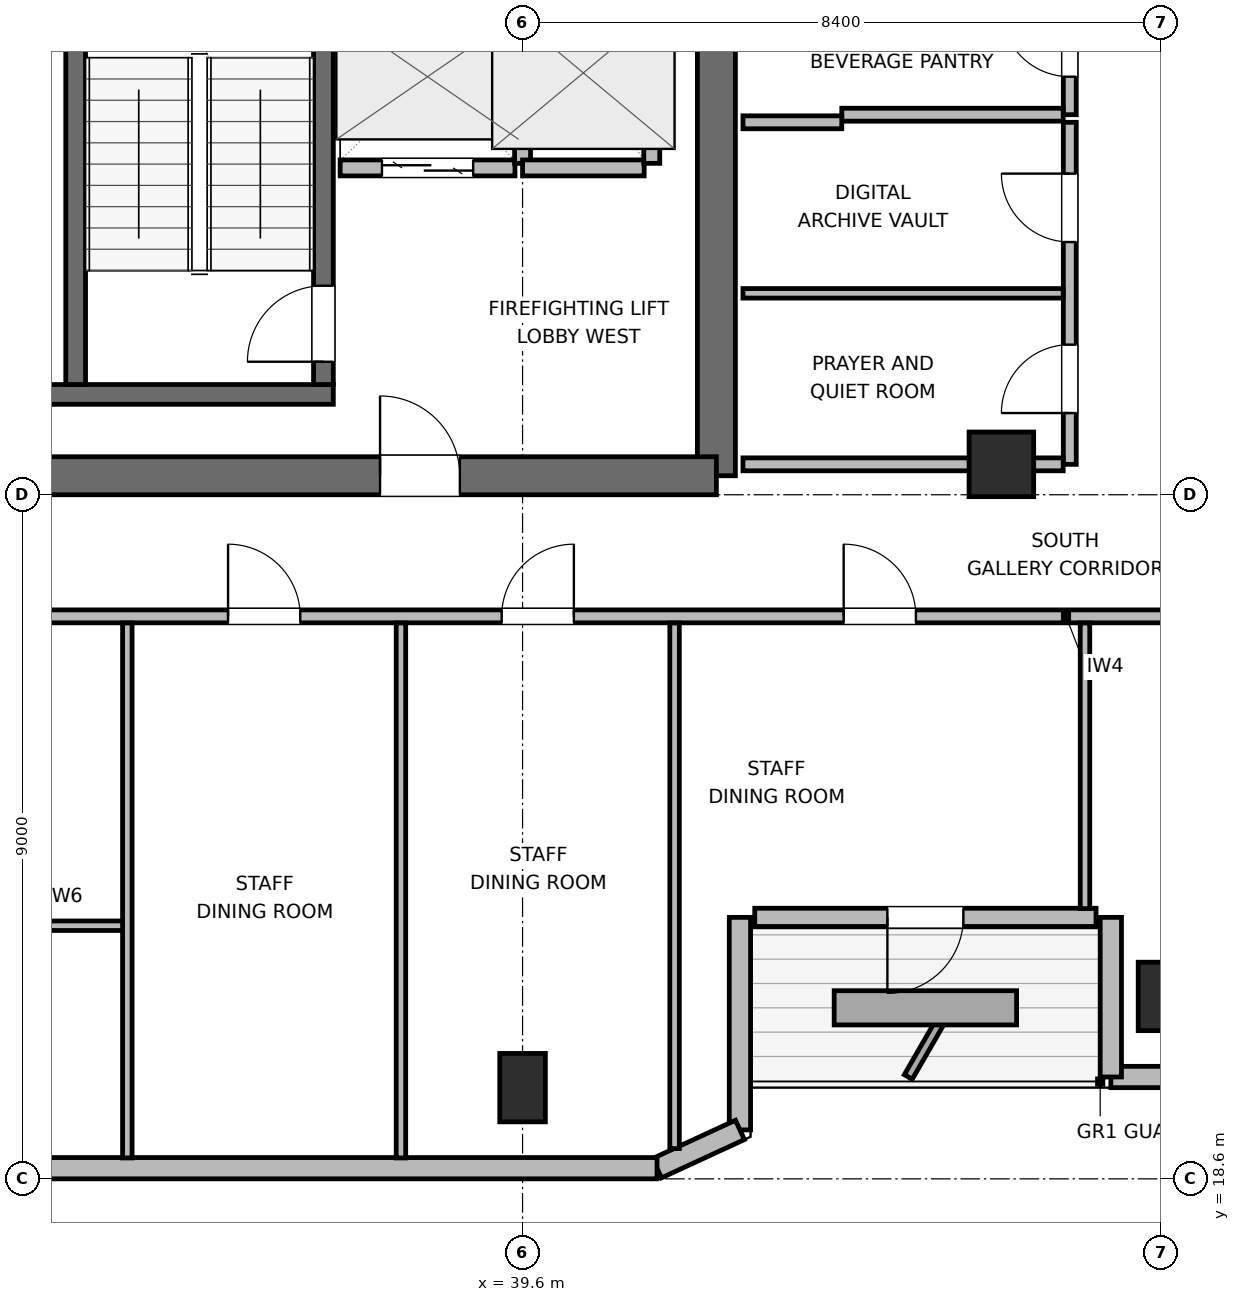
"""IFC4 building model, lengths in metres.
Left out: names, types, materials, properties, quantities, classifications, styles, units other than length and angle.
Written with IfcOpenShell. Run it as: python <this file> out.ifc"""

import sys

from ifc_helpers import new_model, si_unit, direction, frame, frame_2d, origin, origin_2d, place, context, subcontext, project, spatial, rectangle, extrude, element, fill, save


model = new_model("IFC4")
c1 = context("Model", 3, precision=1e-05, world=origin(), true_north=direction((0.0, 1.0)))
c2 = subcontext(c1, "Body", "Model", "MODEL_VIEW")
j1 = project(units=[si_unit("LENGTHUNIT", "METRE"), si_unit("PLANEANGLEUNIT", "RADIAN")], contexts=[c1])
p1 = place(None, origin())
s1 = spatial("IfcSite", under=j1, at=p1, CompositionType="ELEMENT")
p2 = place(p1, origin())
s2 = spatial("IfcBuilding", under=s1, at=p2, CompositionType="ELEMENT")
p3 = place(p2, frame((0.0, 0.0, 302.4)))
s3 = spatial("IfcBuildingStorey", under=s2, at=p3, CompositionType="ELEMENT", Elevation=302.4)
p4 = place(p3, frame((42.15, 27.85, 0.0), z_axis=(0.0, 0.0, 1.0), x_axis=(0.0, 1.0, 0.0)))
e1 = element("IfcWall", 1, at=p4, inside=s3, PredefinedType="SHEAR", context=c2, shape_type="SweptSolid", body=[
    extrude(rectangle(XDim=6.55, YDim=0.5, at=frame_2d((3.275, 0.0))), origin(), (0.0, 0.0, 1.0), 3.9),
])
p5 = place(p3, frame((32.65, 27.85, 0.0), z_axis=(0.0, 0.0, 1.0), x_axis=(1.0, 0.0, 0.0)))
e2 = element("IfcWall", 2, at=p5, inside=s3, PredefinedType="SHEAR", context=c2, shape_type="SweptSolid", body=[
    extrude(rectangle(XDim=9.5, YDim=0.5, at=frame_2d((4.75, 0.0))), origin(), (0.0, 0.0, 1.0), 3.9),
])
p6 = place(p5, frame((5.075, 0.0, 0.0)))
e3 = element("IfcOpeningElement", 3, at=p6, cuts=e2, PredefinedType="OPENING", context=c2, shape_type="SweptSolid", body=[
    extrude(rectangle(XDim=1.05, YDim=2.04, at=frame_2d((0.525, 1.02))), frame((0.0, 0.26, 0.0), z_axis=(0.0, -1.0, 0.0), x_axis=(1.0, 0.0, 0.0)), (0.0, 0.0, 1.0), 0.52),
])
p7 = place(p3, frame((32.9, 28.92, 0.0), z_axis=(0.0, 0.0, 1.0), x_axis=(1.0, 0.0, 0.0)))
e4 = element("IfcWall", 4, at=p7, inside=s3, PredefinedType="SHEAR", context=c2, shape_type="SweptSolid", body=[
    extrude(rectangle(XDim=4.21, YDim=0.26, at=frame_2d((2.105, 0.0))), origin(), (0.0, 0.0, 1.0), 3.9),
])
p8 = place(p3, frame((33.72, 29.05, 0.0), z_axis=(0.0, 0.0, 1.0), x_axis=(0.0, 1.0, 0.0)))
e5 = element("IfcWall", 5, at=p8, inside=s3, PredefinedType="SHEAR", context=c2, shape_type="SweptSolid", body=[
    extrude(rectangle(XDim=7.6, YDim=0.26, at=frame_2d((3.8, 0.0))), origin(), (0.0, 0.0, 1.0), 3.9),
])
p9 = place(p3, frame((36.98, 29.05, 0.0), z_axis=(0.0, 0.0, 1.0), x_axis=(0.0, 1.0, 0.0)))
e6 = element("IfcWall", 6, at=p9, inside=s3, PredefinedType="SHEAR", context=c2, shape_type="SweptSolid", body=[
    extrude(rectangle(XDim=7.6, YDim=0.26, at=frame_2d((3.8, 0.0))), origin(), (0.0, 0.0, 1.0), 3.9),
])
p10 = place(p9, frame((0.3, 0.0, 0.0)))
e7 = element("IfcOpeningElement", 7, at=p10, cuts=e6, PredefinedType="OPENING", context=c2, shape_type="SweptSolid", body=[
    extrude(rectangle(XDim=1.0, YDim=2.04, at=frame_2d((0.5, 1.02))), frame((0.0, 0.14, 0.0), z_axis=(0.0, -1.0, 0.0), x_axis=(1.0, 0.0, 0.0)), (0.0, 0.0, 1.0), 0.28),
])
for number, where, z_axis, x_axis in (
    (8, (39.6, 19.8, 0.0), (0.0, 0.0, 1.0), (1.0, 0.0, 0.0)),
    (9, (48.0, 21.0, 0.0), (0.0, 0.0, 1.0), (1.0, 0.0, 0.0)),
):
    element("IfcColumn", number, at=place(p3, frame(where, z_axis=z_axis, x_axis=x_axis)), inside=s3, PredefinedType="COLUMN", context=c2, shape_type="SweptSolid", body=[
        extrude(rectangle(XDim=0.6, YDim=0.9, at=origin_2d()), origin(), (0.0, 0.0, 1.0), 3.9),
    ])
p11 = place(p3, frame((45.9, 28.0, 0.0), z_axis=(0.0, 0.0, 1.0), x_axis=(1.0, 0.0, 0.0)))
e10 = element("IfcColumn", 10, at=p11, inside=s3, PredefinedType="COLUMN", context=c2, shape_type="SweptSolid", body=[
    extrude(rectangle(XDim=0.85, YDim=0.85, at=origin_2d()), origin(), (0.0, 0.0, 1.0), 3.9),
])
p12 = place(p3, frame((52.031, 19.94, 0.0), z_axis=(0.0, 0.0, 1.0), x_axis=(-1.0, 0.0, 0.0)))
e11 = element("IfcWall", 11, at=p12, inside=s3, PredefinedType="SOLIDWALL", context=c2, shape_type="SweptSolid", body=[
    extrude(rectangle(XDim=4.691, YDim=0.28, at=frame_2d((2.345, 0.0))), origin(), (0.0, 0.0, 1.0), 2.265),
])
p13 = place(p12, frame((1.766, 0.0, 0.85)))
e12 = element("IfcOpeningElement", 12, at=p13, cuts=e11, PredefinedType="OPENING", context=c2, shape_type="SweptSolid", body=[
    extrude(rectangle(XDim=1.6, YDim=1.0, at=frame_2d((0.8, 0.5))), frame((0.0, 0.15, 0.0), z_axis=(0.0, -1.0, 0.0), x_axis=(1.0, 0.0, 0.0)), (0.0, 0.0, 1.0), 0.3),
])
p14 = place(p3, frame((47.34, 19.94, 0.0), z_axis=(0.0, 0.0, 1.0), x_axis=(0.0, 1.0, 0.0)))
e13 = element("IfcWall", 13, at=p14, inside=s3, PredefinedType="SOLIDWALL", context=c2, shape_type="SweptSolid", body=[
    extrude(rectangle(XDim=2.1, YDim=0.28, at=frame_2d((1.05, 0.0))), origin(), (0.0, 0.0, 1.0), 2.265),
])
p15 = place(p3, frame((47.145, 22.04, 0.0), z_axis=(0.0, 0.0, 1.0), x_axis=(-1.0, 0.0, 0.0)))
e14 = element("IfcWall", 14, at=p15, inside=s3, PredefinedType="SOLIDWALL", context=c2, shape_type="SweptSolid", body=[
    extrude(rectangle(XDim=4.49, YDim=0.24, at=frame_2d((2.245, 0.0))), origin(), (0.0, 0.0, 1.0), 3.68),
])
p16 = place(p15, frame((1.745, 0.0, 0.0)))
e15 = element("IfcOpeningElement", 15, at=p16, cuts=e14, PredefinedType="OPENING", context=c2, shape_type="SweptSolid", body=[
    extrude(rectangle(XDim=1.0, YDim=2.02, at=frame_2d((0.5, 1.01))), frame((0.0, 0.13, 0.0), z_axis=(0.0, -1.0, 0.0), x_axis=(1.0, 0.0, 0.0)), (0.0, 0.0, 1.0), 0.26),
])
p17 = place(p3, frame((42.46, 22.04, 0.0), z_axis=(0.0, 0.0, 1.0), x_axis=(0.0, -1.0, 0.0)))
e16 = element("IfcWall", 16, at=p17, inside=s3, PredefinedType="SOLIDWALL", context=c2, shape_type="SweptSolid", body=[
    extrude(rectangle(XDim=2.796, YDim=0.28, at=frame_2d((1.398, 0.0))), origin(), (0.0, 0.0, 1.0), 2.265),
])
p18 = place(p3, frame((42.46, 19.244, 0.0), z_axis=(0.0, 0.0, 1.0), x_axis=(-0.907893953211, -0.419199916176, 0.0)))
e17 = element("IfcWall", 17, at=p18, inside=s3, PredefinedType="SOLIDWALL", context=c2, shape_type="SweptSolid", body=[
    extrude(rectangle(XDim=1.201, YDim=0.28, at=frame_2d((0.601, 0.0))), origin(), (0.0, 0.0, 1.0), 3.68),
])
p19 = place(p3, frame((41.369, 18.74, 0.0), z_axis=(0.0, 0.0, 1.0), x_axis=(-1.0, 0.0, 0.0)))
e18 = element("IfcWall", 18, at=p19, inside=s3, PredefinedType="SOLIDWALL", context=c2, shape_type="SweptSolid", body=[
    extrude(rectangle(XDim=11.351, YDim=0.28, at=frame_2d((5.675, 0.0))), origin(), (0.0, 0.0, 1.0), 3.68),
])
p20 = place(p3, frame((37.2, 31.9, 0.0), z_axis=(0.0, 0.0, 1.0), x_axis=(1.0, 0.0, 0.0)))
e19 = element("IfcWall", 19, at=p20, inside=s3, PredefinedType="PARTITIONING", context=c2, shape_type="SweptSolid", body=[
    extrude(rectangle(XDim=2.3, YDim=0.21, at=frame_2d((1.15, 0.0))), origin(), (0.0, 0.0, 1.0), 3.68),
])
p21 = place(p20, frame((0.55, 0.0, 0.0)))
e20 = element("IfcOpeningElement", 20, at=p21, cuts=e19, PredefinedType="OPENING", context=c2, shape_type="SweptSolid", body=[
    extrude(rectangle(XDim=1.2, YDim=2.04, at=frame_2d((0.6, 1.02))), frame((0.0, 0.115, 0.0), z_axis=(0.0, -1.0, 0.0), x_axis=(1.0, 0.0, 0.0)), (0.0, 0.0, 1.0), 0.23),
])
p22 = place(p3, frame((39.6, 31.96, 0.0), z_axis=(0.0, 0.0, 1.0), x_axis=(0.0, 1.0, 0.0)))
e21 = element("IfcWall", 21, at=p22, inside=s3, PredefinedType="PARTITIONING", context=c2, shape_type="SweptSolid", body=[
    extrude(rectangle(XDim=2.28, YDim=0.21, at=frame_2d((1.14, 0.0))), origin(), (0.0, 0.0, 1.0), 3.68),
])
p23 = place(p3, frame((39.6, 31.9, 0.0), z_axis=(0.0, 0.0, 1.0), x_axis=(1.0, 0.0, 0.0)))
e22 = element("IfcWall", 22, at=p23, inside=s3, PredefinedType="PARTITIONING", context=c2, shape_type="SweptSolid", body=[
    extrude(rectangle(XDim=1.6, YDim=0.21, at=frame_2d((0.8, 0.0))), origin(), (0.0, 0.0, 1.0), 3.68),
])
p24 = place(p3, frame((41.3, 31.96, 0.0), z_axis=(0.0, 0.0, 1.0), x_axis=(0.0, 1.0, 0.0)))
e23 = element("IfcWall", 23, at=p24, inside=s3, PredefinedType="PARTITIONING", context=c2, shape_type="SweptSolid", body=[
    extrude(rectangle(XDim=2.38, YDim=0.21, at=frame_2d((1.19, 0.0))), origin(), (0.0, 0.0, 1.0), 3.68),
])
p25 = place(p3, frame((46.8, 32.6, 0.0), z_axis=(0.0, 0.0, 1.0), x_axis=(0.0, 1.0, 0.0)))
e24 = element("IfcWall", 24, at=p25, inside=s3, PredefinedType="PARTITIONING", context=c2, shape_type="SweptSolid", body=[
    extrude(rectangle(XDim=3.8, YDim=0.17, at=frame_2d((1.9, 0.0))), origin(), (0.0, 0.0, 1.0), 3.68),
])
p26 = place(p25, frame((0.5, 0.0, 0.0)))
e25 = element("IfcOpeningElement", 25, at=p26, cuts=e24, PredefinedType="OPENING", context=c2, shape_type="SweptSolid", body=[
    extrude(rectangle(XDim=0.9, YDim=2.02, at=frame_2d((0.45, 1.01))), frame((0.0, 0.095, 0.0), z_axis=(0.0, -1.0, 0.0), x_axis=(1.0, 0.0, 0.0)), (0.0, 0.0, 1.0), 0.19),
])
p27 = place(p25, frame((2.4, 0.0, 0.0)))
e26 = element("IfcOpeningElement", 26, at=p27, cuts=e24, PredefinedType="OPENING", context=c2, shape_type="SweptSolid", body=[
    extrude(rectangle(XDim=0.9, YDim=2.02, at=frame_2d((0.45, 1.01))), frame((0.0, 0.095, 0.0), z_axis=(0.0, -1.0, 0.0), x_axis=(1.0, 0.0, 0.0)), (0.0, 0.0, 1.0), 0.19),
])
p28 = place(p3, frame((43.8, 32.6, 0.0), z_axis=(0.0, 0.0, 1.0), x_axis=(1.0, 0.0, 0.0)))
e27 = element("IfcWall", 27, at=p28, inside=s3, PredefinedType="PARTITIONING", context=c2, shape_type="SweptSolid", body=[
    extrude(rectangle(XDim=2.913, YDim=0.17, at=frame_2d((1.457, 0.0))), origin(), (0.0, 0.0, 1.0), 3.68),
])
p29 = place(p3, frame((46.8, 28.0, 0.0), z_axis=(0.0, 0.0, 1.0), x_axis=(0.0, 1.0, 0.0)))
e28 = element("IfcWall", 28, at=p29, inside=s3, PredefinedType="PARTITIONING", context=c2, shape_type="SweptSolid", body=[
    extrude(rectangle(XDim=4.5, YDim=0.17, at=frame_2d((2.25, 0.0))), origin(), (0.0, 0.0, 1.0), 3.68),
])
p30 = place(p29, frame((0.675, 0.0, 0.0)))
e29 = element("IfcOpeningElement", 29, at=p30, cuts=e28, PredefinedType="OPENING", context=c2, shape_type="SweptSolid", body=[
    extrude(rectangle(XDim=0.9, YDim=2.02, at=frame_2d((0.45, 1.01))), frame((0.0, 0.095, 0.0), z_axis=(0.0, -1.0, 0.0), x_axis=(1.0, 0.0, 0.0)), (0.0, 0.0, 1.0), 0.19),
])
p31 = place(p29, frame((2.925, 0.0, 0.0)))
e30 = element("IfcOpeningElement", 30, at=p31, cuts=e28, PredefinedType="OPENING", context=c2, shape_type="SweptSolid", body=[
    extrude(rectangle(XDim=0.9, YDim=2.02, at=frame_2d((0.45, 1.01))), frame((0.0, 0.095, 0.0), z_axis=(0.0, -1.0, 0.0), x_axis=(1.0, 0.0, 0.0)), (0.0, 0.0, 1.0), 0.19),
])
p32 = place(p3, frame((42.5, 28.0, 0.0), z_axis=(0.0, 0.0, 1.0), x_axis=(1.0, 0.0, 0.0)))
e31 = element("IfcWall", 31, at=p32, inside=s3, PredefinedType="PARTITIONING", context=c2, shape_type="SweptSolid", body=[
    extrude(rectangle(XDim=4.213, YDim=0.17, at=frame_2d((2.106, 0.0))), origin(), (0.0, 0.0, 1.0), 2.765),
])
p33 = place(p3, frame((42.5, 32.5, 0.0), z_axis=(0.0, 0.0, 1.0), x_axis=(1.0, 0.0, 0.0)))
e32 = element("IfcWall", 32, at=p33, inside=s3, PredefinedType="PARTITIONING", context=c2, shape_type="SweptSolid", body=[
    extrude(rectangle(XDim=1.3, YDim=0.17, at=frame_2d((0.65, 0.0))), origin(), (0.0, 0.0, 1.0), 3.68),
])
p34 = place(p3, frame((42.5, 30.25, 0.0), z_axis=(0.0, 0.0, 1.0), x_axis=(1.0, 0.0, 0.0)))
e33 = element("IfcWall", 33, at=p34, inside=s3, PredefinedType="PARTITIONING", context=c2, shape_type="SweptSolid", body=[
    extrude(rectangle(XDim=4.213, YDim=0.125, at=frame_2d((2.106, 0.0))), origin(), (0.0, 0.0, 1.0), 3.68),
])
p35 = place(p3, frame((30.725, 26.0, 0.0), z_axis=(0.0, 0.0, 1.0), x_axis=(1.0, 0.0, 0.0)))
e34 = element("IfcWall", 34, at=p35, inside=s3, PredefinedType="PARTITIONING", context=c2, shape_type="SweptSolid", body=[
    extrude(rectangle(XDim=32.875, YDim=0.17, at=frame_2d((16.438, 0.0))), origin(), (0.0, 0.0, 1.0), 3.68),
])
p36 = place(p35, frame((1.362, 0.0, 0.0)))
e35 = element("IfcOpeningElement", 35, at=p36, cuts=e34, PredefinedType="OPENING", context=c2, shape_type="SweptSolid", body=[
    extrude(rectangle(XDim=0.95, YDim=2.04, at=frame_2d((0.475, 1.02))), frame((0.0, 0.095, 0.0), z_axis=(0.0, -1.0, 0.0), x_axis=(1.0, 0.0, 0.0)), (0.0, 0.0, 1.0), 0.19),
])
p37 = place(p35, frame((5.0, 0.0, 0.0)))
e36 = element("IfcOpeningElement", 36, at=p37, cuts=e34, PredefinedType="OPENING", context=c2, shape_type="SweptSolid", body=[
    extrude(rectangle(XDim=0.95, YDim=2.04, at=frame_2d((0.475, 1.02))), frame((0.0, 0.095, 0.0), z_axis=(0.0, -1.0, 0.0), x_axis=(1.0, 0.0, 0.0)), (0.0, 0.0, 1.0), 0.19),
])
p38 = place(p35, frame((8.6, 0.0, 0.0)))
e37 = element("IfcOpeningElement", 37, at=p38, cuts=e34, PredefinedType="OPENING", context=c2, shape_type="SweptSolid", body=[
    extrude(rectangle(XDim=0.95, YDim=2.04, at=frame_2d((0.475, 1.02))), frame((0.0, 0.095, 0.0), z_axis=(0.0, -1.0, 0.0), x_axis=(1.0, 0.0, 0.0)), (0.0, 0.0, 1.0), 0.19),
])
p39 = place(p35, frame((13.1, 0.0, 0.0)))
e38 = element("IfcOpeningElement", 38, at=p39, cuts=e34, PredefinedType="OPENING", context=c2, shape_type="SweptSolid", body=[
    extrude(rectangle(XDim=0.95, YDim=2.04, at=frame_2d((0.475, 1.02))), frame((0.0, 0.095, 0.0), z_axis=(0.0, -1.0, 0.0), x_axis=(1.0, 0.0, 0.0)), (0.0, 0.0, 1.0), 0.19),
])
p40 = place(p35, frame((18.0, 0.0, 0.0)))
e39 = element("IfcOpeningElement", 39, at=p40, cuts=e34, PredefinedType="OPENING", context=c2, shape_type="SweptSolid", body=[
    extrude(rectangle(XDim=0.95, YDim=2.04, at=frame_2d((0.475, 1.02))), frame((0.0, 0.095, 0.0), z_axis=(0.0, -1.0, 0.0), x_axis=(1.0, 0.0, 0.0)), (0.0, 0.0, 1.0), 0.19),
])
p41 = place(p35, frame((22.4, 0.0, 0.0)))
e40 = element("IfcOpeningElement", 40, at=p41, cuts=e34, PredefinedType="OPENING", context=c2, shape_type="SweptSolid", body=[
    extrude(rectangle(XDim=0.95, YDim=2.04, at=frame_2d((0.475, 1.02))), frame((0.0, 0.095, 0.0), z_axis=(0.0, -1.0, 0.0), x_axis=(1.0, 0.0, 0.0)), (0.0, 0.0, 1.0), 0.19),
])
p42 = place(p35, frame((26.8, 0.0, 0.0)))
e41 = element("IfcOpeningElement", 41, at=p42, cuts=e34, PredefinedType="OPENING", context=c2, shape_type="SweptSolid", body=[
    extrude(rectangle(XDim=0.95, YDim=2.04, at=frame_2d((0.475, 1.02))), frame((0.0, 0.095, 0.0), z_axis=(0.0, -1.0, 0.0), x_axis=(1.0, 0.0, 0.0)), (0.0, 0.0, 1.0), 0.19),
])
p43 = place(p35, frame((30.7, 0.0, 0.0)))
e42 = element("IfcOpeningElement", 42, at=p43, cuts=e34, PredefinedType="OPENING", context=c2, shape_type="SweptSolid", body=[
    extrude(rectangle(XDim=0.95, YDim=2.04, at=frame_2d((0.475, 1.02))), frame((0.0, 0.095, 0.0), z_axis=(0.0, -1.0, 0.0), x_axis=(1.0, 0.0, 0.0)), (0.0, 0.0, 1.0), 0.19),
])
p44 = place(p3, frame((25.885, 21.93, 0.0), z_axis=(0.0, 0.0, 1.0), x_axis=(1.0, 0.0, 0.0)))
e43 = element("IfcWall", 43, at=p44, inside=s3, PredefinedType="PARTITIONING", context=c2, shape_type="SweptSolid", body=[
    extrude(rectangle(XDim=8.515, YDim=0.125, at=frame_2d((4.257, 0.0))), origin(), (0.0, 0.0, 1.0), 3.68),
])
p45 = place(p44, frame((3.715, 0.0, 0.0)))
e44 = element("IfcOpeningElement", 44, at=p45, cuts=e43, PredefinedType="OPENING", context=c2, shape_type="SweptSolid", body=[
    extrude(rectangle(XDim=0.9, YDim=2.02, at=frame_2d((0.45, 1.01))), frame((0.0, 0.073, 0.0), z_axis=(0.0, -1.0, 0.0), x_axis=(1.0, 0.0, 0.0)), (0.0, 0.0, 1.0), 0.145),
])
for number, where, z_axis, x_axis in (
    (45, (34.4, 18.875, 0.0), (0.0, 0.0, 1.0), (0.0, 1.0, 0.0)),
    (46, (38.0, 18.875, 0.0), (0.0, 0.0, 1.0), (0.0, 1.0, 0.0)),
):
    element("IfcWall", number, at=place(p3, frame(where, z_axis=z_axis, x_axis=x_axis)), inside=s3, PredefinedType="PARTITIONING", context=c2, shape_type="SweptSolid", body=[
        extrude(rectangle(XDim=7.038, YDim=0.125, at=frame_2d((3.519, 0.0))), origin(), (0.0, 0.0, 1.0), 3.68),
    ])
p46 = place(p3, frame((41.6, 18.998, 0.0), z_axis=(0.0, 0.0, 1.0), x_axis=(0.0, 1.0, 0.0)))
e47 = element("IfcWall", 47, at=p46, inside=s3, PredefinedType="PARTITIONING", context=c2, shape_type="SweptSolid", body=[
    extrude(rectangle(XDim=6.915, YDim=0.125, at=frame_2d((3.458, 0.0))), origin(), (0.0, 0.0, 1.0), 3.043),
])
p47 = place(p3, frame((47.0, 22.155, 0.0), z_axis=(0.0, 0.0, 1.0), x_axis=(0.0, 1.0, 0.0)))
e48 = element("IfcWall", 48, at=p47, inside=s3, PredefinedType="PARTITIONING", context=c2, shape_type="SweptSolid", body=[
    extrude(rectangle(XDim=3.758, YDim=0.125, at=frame_2d((1.879, 0.0))), origin(), (0.0, 0.0, 1.0), 3.68),
])
p48 = place(p16, origin())
e49 = element("IfcDoor", 49, at=p48, inside=s3, OperationType="SINGLE_SWING_RIGHT", PredefinedType="DOOR", context=c2, shape_type="SweptSolid", body=[
    extrude(rectangle(XDim=1.0, YDim=2.02, at=frame_2d((0.5, 1.01))), frame((0.0, 0.025, 0.0), z_axis=(0.0, -1.0, 0.0), x_axis=(1.0, 0.0, 0.0)), (0.0, 0.0, 1.0), 0.05),
])
fill(e15, e49)
p49 = place(p10, origin())
e50 = element("IfcDoor", 50, at=p49, inside=s3, OperationType="SINGLE_SWING_LEFT", PredefinedType="DOOR", context=c2, shape_type="SweptSolid", body=[
    extrude(rectangle(XDim=1.0, YDim=2.04, at=frame_2d((0.5, 1.02))), frame((0.0, 0.025, 0.0), z_axis=(0.0, -1.0, 0.0), x_axis=(1.0, 0.0, 0.0)), (0.0, 0.0, 1.0), 0.05),
])
fill(e7, e50)
p50 = place(p21, origin())
e51 = element("IfcDoor", 51, at=p50, inside=s3, OperationType="DOUBLE_DOOR_SLIDING", PredefinedType="DOOR", context=c2, shape_type="SweptSolid", body=[
    extrude(rectangle(XDim=1.2, YDim=2.04, at=frame_2d((0.6, 1.02))), frame((0.0, 0.025, 0.0), z_axis=(0.0, -1.0, 0.0), x_axis=(1.0, 0.0, 0.0)), (0.0, 0.0, 1.0), 0.05),
])
fill(e20, e51)
p51 = place(p6, origin())
e52 = element("IfcDoor", 52, at=p51, inside=s3, OperationType="SINGLE_SWING_LEFT", PredefinedType="DOOR", context=c2, shape_type="SweptSolid", body=[
    extrude(rectangle(XDim=1.05, YDim=2.04, at=frame_2d((0.525, 1.02))), frame((0.0, 0.025, 0.0), z_axis=(0.0, -1.0, 0.0), x_axis=(1.0, 0.0, 0.0)), (0.0, 0.0, 1.0), 0.05),
])
fill(e3, e52)
p52 = place(p26, origin())
e53 = element("IfcDoor", 53, at=p52, inside=s3, OperationType="SINGLE_SWING_RIGHT", PredefinedType="DOOR", context=c2, shape_type="SweptSolid", body=[
    extrude(rectangle(XDim=0.9, YDim=2.02, at=frame_2d((0.45, 1.01))), frame((0.0, 0.025, 0.0), z_axis=(0.0, -1.0, 0.0), x_axis=(1.0, 0.0, 0.0)), (0.0, 0.0, 1.0), 0.05),
])
fill(e25, e53)
p53 = place(p30, origin())
e54 = element("IfcDoor", 54, at=p53, inside=s3, OperationType="SINGLE_SWING_LEFT", PredefinedType="DOOR", context=c2, shape_type="SweptSolid", body=[
    extrude(rectangle(XDim=0.9, YDim=2.02, at=frame_2d((0.45, 1.01))), frame((0.0, 0.025, 0.0), z_axis=(0.0, -1.0, 0.0), x_axis=(1.0, 0.0, 0.0)), (0.0, 0.0, 1.0), 0.05),
])
fill(e29, e54)
p54 = place(p31, origin())
e55 = element("IfcDoor", 55, at=p54, inside=s3, OperationType="SINGLE_SWING_RIGHT", PredefinedType="DOOR", context=c2, shape_type="SweptSolid", body=[
    extrude(rectangle(XDim=0.9, YDim=2.02, at=frame_2d((0.45, 1.01))), frame((0.0, 0.025, 0.0), z_axis=(0.0, -1.0, 0.0), x_axis=(1.0, 0.0, 0.0)), (0.0, 0.0, 1.0), 0.05),
])
fill(e30, e55)
p55 = place(p37, origin())
e56 = element("IfcDoor", 56, at=p55, inside=s3, OperationType="SINGLE_SWING_LEFT", PredefinedType="DOOR", context=c2, shape_type="SweptSolid", body=[
    extrude(rectangle(XDim=0.95, YDim=2.04, at=frame_2d((0.475, 1.02))), frame((0.0, 0.025, 0.0), z_axis=(0.0, -1.0, 0.0), x_axis=(1.0, 0.0, 0.0)), (0.0, 0.0, 1.0), 0.05),
])
fill(e36, e56)
p56 = place(p38, origin())
e57 = element("IfcDoor", 57, at=p56, inside=s3, OperationType="SINGLE_SWING_RIGHT", PredefinedType="DOOR", context=c2, shape_type="SweptSolid", body=[
    extrude(rectangle(XDim=0.95, YDim=2.04, at=frame_2d((0.475, 1.02))), frame((0.0, 0.025, 0.0), z_axis=(0.0, -1.0, 0.0), x_axis=(1.0, 0.0, 0.0)), (0.0, 0.0, 1.0), 0.05),
])
fill(e37, e57)
p57 = place(p39, origin())
e58 = element("IfcDoor", 58, at=p57, inside=s3, OperationType="SINGLE_SWING_LEFT", PredefinedType="DOOR", context=c2, shape_type="SweptSolid", body=[
    extrude(rectangle(XDim=0.95, YDim=2.04, at=frame_2d((0.475, 1.02))), frame((0.0, 0.025, 0.0), z_axis=(0.0, -1.0, 0.0), x_axis=(1.0, 0.0, 0.0)), (0.0, 0.0, 1.0), 0.05),
])
fill(e38, e58)
save(model, sys.argv[1])
